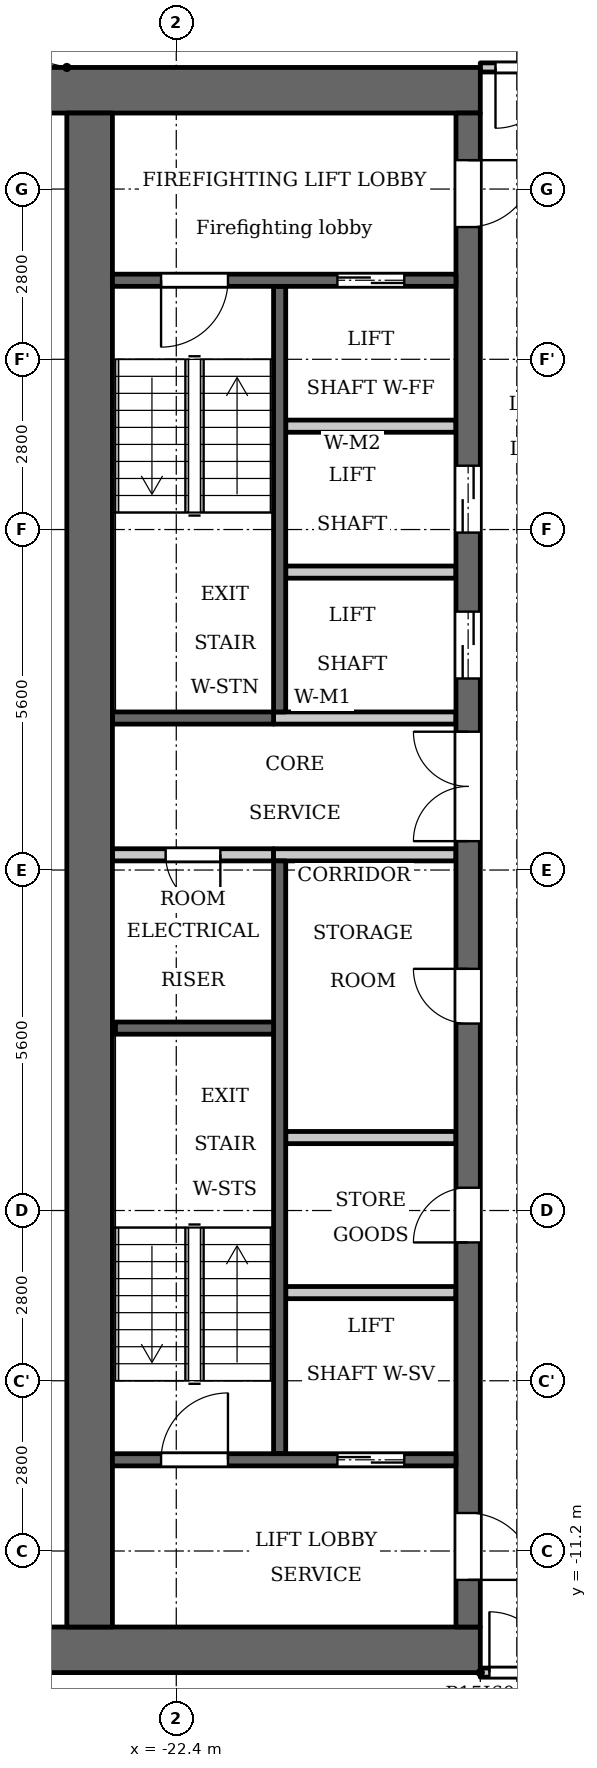
"""IFC4 building model, lengths in metres.
Left out: names, types, materials, properties, quantities, classifications, styles, units other than length and angle.
Written with IfcOpenShell. Run it as: python <this file> out.ifc"""

import sys

from ifc_helpers import new_model, si_unit, direction, frame, frame_2d, origin, place, context, subcontext, project, spatial, rectangle, extrude, element, fill, save


model = new_model("IFC4")
c1 = context("Model", 3, precision=1e-05, world=origin(), true_north=direction((0.0, 1.0)))
c2 = subcontext(c1, "Body", "Model", "MODEL_VIEW")
j1 = project(units=[si_unit("LENGTHUNIT", "METRE"), si_unit("PLANEANGLEUNIT", "RADIAN")], contexts=[c1])
p1 = place(None, origin())
s1 = spatial("IfcSite", under=j1, at=p1, CompositionType="ELEMENT")
p2 = place(p1, origin())
s2 = spatial("IfcBuilding", under=s1, at=p2, CompositionType="ELEMENT")
p3 = place(p2, frame((0.0, 0.0, 195.9)))
s3 = spatial("IfcBuildingStorey", under=s2, at=p3, CompositionType="ELEMENT", Elevation=195.9)
p4 = place(p3, frame((-20.7, 2.6, 0.0), z_axis=(0.0, 0.0, 1.0), x_axis=(0.0, 1.0, 0.0)))
e1 = element("IfcWall", 1, at=p4, inside=s3, PredefinedType="SHEAR", context=c2, shape_type="SweptSolid", body=[
    extrude(rectangle(XDim=7.0, YDim=0.2, at=frame_2d((3.5, 0.0))), origin(), (0.0, 0.0, 1.0), 3.2),
])
p5 = place(p3, frame((-20.7, -9.6, 0.0), z_axis=(0.0, 0.0, 1.0), x_axis=(0.0, 1.0, 0.0)))
e2 = element("IfcWall", 2, at=p5, inside=s3, PredefinedType="SHEAR", context=c2, shape_type="SweptSolid", body=[
    extrude(rectangle(XDim=9.75, YDim=0.2, at=frame_2d((4.875, 0.0))), origin(), (0.0, 0.0, 1.0), 3.2),
])
p6 = place(p3, frame((-20.8, 2.5, 0.0), z_axis=(0.0, 0.0, 1.0), x_axis=(-1.0, 0.0, 0.0)))
e3 = element("IfcWall", 3, at=p6, inside=s3, PredefinedType="SHEAR", context=c2, shape_type="SweptSolid", body=[
    extrude(rectangle(XDim=2.65, YDim=0.2, at=frame_2d((1.325, 0.0))), origin(), (0.0, 0.0, 1.0), 3.2),
])
p7 = place(p3, frame((-20.8, 0.25, 0.0), z_axis=(0.0, 0.0, 1.0), x_axis=(-1.0, 0.0, 0.0)))
e4 = element("IfcWall", 4, at=p7, inside=s3, PredefinedType="PARTITIONING", context=c2, shape_type="SweptSolid", body=[
    extrude(rectangle(XDim=2.65, YDim=0.2, at=frame_2d((1.325, 0.0))), origin(), (0.0, 0.0, 1.0), 3.2),
])
p8 = place(p7, frame((0.875, 0.0, 0.0)))
e5 = element("IfcOpeningElement", 5, at=p8, cuts=e4, PredefinedType="OPENING", context=c2, shape_type="SweptSolid", body=[
    extrude(rectangle(XDim=0.9, YDim=2.1, at=frame_2d((0.45, 1.05))), frame((0.0, 0.11, 0.0), z_axis=(0.0, -1.0, 0.0), x_axis=(1.0, 0.0, 0.0)), (0.0, 0.0, 1.0), 0.22),
])
for number, where, z_axis, x_axis in (
    (6, (-17.4, 12.825, 0.0), (0.0, 0.0, 1.0), (-1.0, 0.0, 0.0)),
    (7, (-17.4, -12.825, 0.0), (0.0, 0.0, 1.0), (-1.0, 0.0, 0.0)),
):
    element("IfcWall", number, at=place(p3, frame(where, z_axis=z_axis, x_axis=x_axis)), inside=s3, PredefinedType="SHEAR", context=c2, shape_type="SweptSolid", body=[
        extrude(rectangle(XDim=7.6, YDim=0.75, at=frame_2d((3.8, 0.0))), origin(), (0.0, 0.0, 1.0), 3.2),
    ])
p9 = place(p3, frame((-17.8, -4.4, 0.0), z_axis=(0.0, 0.0, 1.0), x_axis=(-1.0, 0.0, 0.0)))
e8 = element("IfcWall", 8, at=p9, inside=s3, PredefinedType="PARTITIONING", context=c2, shape_type="SweptSolid", body=[
    extrude(rectangle(XDim=2.8, YDim=0.2, at=frame_2d((1.4, 0.0))), origin(), (0.0, 0.0, 1.0), 3.2),
])
p10 = place(p3, frame((-17.6, -12.45, 0.0), z_axis=(0.0, 0.0, 1.0), x_axis=(0.0, 1.0, 0.0)))
e9 = element("IfcWall", 9, at=p10, inside=s3, PredefinedType="SHEAR", context=c2, shape_type="SweptSolid", body=[
    extrude(rectangle(XDim=24.9, YDim=0.4, at=frame_2d((12.45, 0.0))), origin(), (0.0, 0.0, 1.0), 3.2),
])
p11 = place(p10, frame((6.325, 0.0, 0.0)))
e10 = element("IfcOpeningElement", 10, at=p11, cuts=e9, PredefinedType="OPENING", context=c2, shape_type="SweptSolid", body=[
    extrude(rectangle(XDim=0.9, YDim=2.1, at=frame_2d((0.45, 1.05))), frame((0.0, 0.21, 0.0), z_axis=(0.0, -1.0, 0.0), x_axis=(1.0, 0.0, 0.0)), (0.0, 0.0, 1.0), 0.42),
])
p12 = place(p10, frame((9.925, 0.0, 0.0)))
e11 = element("IfcOpeningElement", 11, at=p12, cuts=e9, PredefinedType="OPENING", context=c2, shape_type="SweptSolid", body=[
    extrude(rectangle(XDim=0.9, YDim=2.1, at=frame_2d((0.45, 1.05))), frame((0.0, 0.21, 0.0), z_axis=(0.0, -1.0, 0.0), x_axis=(1.0, 0.0, 0.0)), (0.0, 0.0, 1.0), 0.42),
])
p13 = place(p10, frame((15.6, 0.0, 0.0)))
e12 = element("IfcOpeningElement", 12, at=p13, cuts=e9, PredefinedType="OPENING", context=c2, shape_type="SweptSolid", body=[
    extrude(rectangle(XDim=1.1, YDim=2.1, at=frame_2d((0.55, 1.05))), frame((0.0, 0.21, 0.0), z_axis=(0.0, -1.0, 0.0), x_axis=(1.0, 0.0, 0.0)), (0.0, 0.0, 1.0), 0.42),
])
p14 = place(p10, frame((18.0, 0.0, 0.0)))
e13 = element("IfcOpeningElement", 13, at=p14, cuts=e9, PredefinedType="OPENING", context=c2, shape_type="SweptSolid", body=[
    extrude(rectangle(XDim=1.1, YDim=2.1, at=frame_2d((0.55, 1.05))), frame((0.0, 0.21, 0.0), z_axis=(0.0, -1.0, 0.0), x_axis=(1.0, 0.0, 0.0)), (0.0, 0.0, 1.0), 0.42),
])
p15 = place(p10, frame((23.025, 0.0, 0.0)))
e14 = element("IfcOpeningElement", 14, at=p15, cuts=e9, PredefinedType="OPENING", context=c2, shape_type="SweptSolid", body=[
    extrude(rectangle(XDim=1.1, YDim=2.1, at=frame_2d((0.55, 1.05))), frame((0.0, 0.21, 0.0), z_axis=(0.0, -1.0, 0.0), x_axis=(1.0, 0.0, 0.0)), (0.0, 0.0, 1.0), 0.42),
])
p16 = place(p10, frame((0.775, 0.0, 0.0)))
e15 = element("IfcOpeningElement", 15, at=p16, cuts=e9, PredefinedType="OPENING", context=c2, shape_type="SweptSolid", body=[
    extrude(rectangle(XDim=1.1, YDim=2.1, at=frame_2d((0.55, 1.05))), frame((0.0, 0.21, 0.0), z_axis=(0.0, -1.0, 0.0), x_axis=(1.0, 0.0, 0.0)), (0.0, 0.0, 1.0), 0.42),
])
p17 = place(p10, frame((12.925, 0.0, 0.0)))
e16 = element("IfcOpeningElement", 16, at=p17, cuts=e9, PredefinedType="OPENING", context=c2, shape_type="SweptSolid", body=[
    extrude(rectangle(XDim=1.8, YDim=2.1, at=frame_2d((0.9, 1.05))), frame((0.0, 0.21, 0.0), z_axis=(0.0, -1.0, 0.0), x_axis=(1.0, 0.0, 0.0)), (0.0, 0.0, 1.0), 0.42),
])
p18 = place(p3, frame((-23.825, -12.45, 0.0), z_axis=(0.0, 0.0, 1.0), x_axis=(0.0, 1.0, 0.0)))
e17 = element("IfcWall", 17, at=p18, inside=s3, PredefinedType="SHEAR", context=c2, shape_type="SweptSolid", body=[
    extrude(rectangle(XDim=24.9, YDim=0.75, at=frame_2d((12.45, 0.0))), origin(), (0.0, 0.0, 1.0), 3.2),
])
p19 = place(p3, frame((-17.8, -9.7, 0.0), z_axis=(0.0, 0.0, 1.0), x_axis=(-1.0, 0.0, 0.0)))
e18 = element("IfcWall", 18, at=p19, inside=s3, PredefinedType="SHEAR", context=c2, shape_type="SweptSolid", body=[
    extrude(rectangle(XDim=5.65, YDim=0.2, at=frame_2d((2.825, 0.0))), origin(), (0.0, 0.0, 1.0), 3.2),
])
p20 = place(p19, frame((0.85, 0.0, 0.0)))
e19 = element("IfcOpeningElement", 19, at=p20, cuts=e18, PredefinedType="OPENING", context=c2, shape_type="SweptSolid", body=[
    extrude(rectangle(XDim=1.1, YDim=2.1, at=frame_2d((0.55, 1.05))), frame((0.0, 0.11, 0.0), z_axis=(0.0, -1.0, 0.0), x_axis=(1.0, 0.0, 0.0)), (0.0, 0.0, 1.0), 0.22),
])
p21 = place(p19, frame((3.75, 0.0, 0.0)))
e20 = element("IfcOpeningElement", 20, at=p21, cuts=e18, PredefinedType="OPENING", context=c2, shape_type="SweptSolid", body=[
    extrude(rectangle(XDim=1.1, YDim=2.1, at=frame_2d((0.55, 1.05))), frame((0.0, 0.11, 0.0), z_axis=(0.0, -1.0, 0.0), x_axis=(1.0, 0.0, 0.0)), (0.0, 0.0, 1.0), 0.22),
])
p22 = place(p3, frame((-17.8, -6.95, 0.0), z_axis=(0.0, 0.0, 1.0), x_axis=(-1.0, 0.0, 0.0)))
e21 = element("IfcWall", 21, at=p22, inside=s3, PredefinedType="PARTITIONING", context=c2, shape_type="SweptSolid", body=[
    extrude(rectangle(XDim=2.8, YDim=0.2, at=frame_2d((1.4, 0.0))), origin(), (0.0, 0.0, 1.0), 3.2),
])
for number, where, z_axis, x_axis in (
    (22, (-17.8, 0.25, 0.0), (0.0, 0.0, 1.0), (-1.0, 0.0, 0.0)),
    (23, (-17.8, 2.5, 0.0), (0.0, 0.0, 1.0), (-1.0, 0.0, 0.0)),
):
    element("IfcWall", number, at=place(p3, frame(where, z_axis=z_axis, x_axis=x_axis)), inside=s3, PredefinedType="PARTITIONING", context=c2, shape_type="SweptSolid", body=[
        extrude(rectangle(XDim=3.0, YDim=0.2, at=frame_2d((1.5, 0.0))), origin(), (0.0, 0.0, 1.0), 3.2),
    ])
for number, where, z_axis, x_axis in (
    (24, (-17.8, 4.9, 0.0), (0.0, 0.0, 1.0), (-1.0, 0.0, 0.0)),
    (25, (-17.8, 7.3, 0.0), (0.0, 0.0, 1.0), (-1.0, 0.0, 0.0)),
):
    element("IfcWall", number, at=place(p3, frame(where, z_axis=z_axis, x_axis=x_axis)), inside=s3, PredefinedType="PARTITIONING", context=c2, shape_type="SweptSolid", body=[
        extrude(rectangle(XDim=2.8, YDim=0.2, at=frame_2d((1.4, 0.0))), origin(), (0.0, 0.0, 1.0), 3.2),
    ])
p23 = place(p3, frame((-17.8, 9.7, 0.0), z_axis=(0.0, 0.0, 1.0), x_axis=(-1.0, 0.0, 0.0)))
e26 = element("IfcWall", 26, at=p23, inside=s3, PredefinedType="SHEAR", context=c2, shape_type="SweptSolid", body=[
    extrude(rectangle(XDim=5.65, YDim=0.2, at=frame_2d((2.825, 0.0))), origin(), (0.0, 0.0, 1.0), 3.2),
])
p24 = place(p23, frame((0.85, 0.0, 0.0)))
e27 = element("IfcOpeningElement", 27, at=p24, cuts=e26, PredefinedType="OPENING", context=c2, shape_type="SweptSolid", body=[
    extrude(rectangle(XDim=1.1, YDim=2.1, at=frame_2d((0.55, 1.05))), frame((0.0, 0.11, 0.0), z_axis=(0.0, -1.0, 0.0), x_axis=(1.0, 0.0, 0.0)), (0.0, 0.0, 1.0), 0.22),
])
p25 = place(p23, frame((3.75, 0.0, 0.0)))
e28 = element("IfcOpeningElement", 28, at=p25, cuts=e26, PredefinedType="OPENING", context=c2, shape_type="SweptSolid", body=[
    extrude(rectangle(XDim=1.1, YDim=2.1, at=frame_2d((0.55, 1.05))), frame((0.0, 0.11, 0.0), z_axis=(0.0, -1.0, 0.0), x_axis=(1.0, 0.0, 0.0)), (0.0, 0.0, 1.0), 0.22),
])
p26 = place(p3, frame((-20.8, -2.6, 0.0), z_axis=(0.0, 0.0, 1.0), x_axis=(-1.0, 0.0, 0.0)))
e29 = element("IfcWall", 29, at=p26, inside=s3, PredefinedType="SHEAR", context=c2, shape_type="SweptSolid", body=[
    extrude(rectangle(XDim=2.6, YDim=0.2, at=frame_2d((1.3, 0.0))), origin(), (0.0, 0.0, 1.0), 3.2),
])
p27 = place(p3, frame((-17.4, -13.2, 0.0), z_axis=(0.0, 0.0, 1.0), x_axis=(1.0, 0.0, 0.0)))
e30 = element("IfcWall", 30, at=p27, inside=s3, PredefinedType="PARTITIONING", context=c2, shape_type="SweptSolid", body=[
    extrude(rectangle(XDim=34.8, YDim=0.15, at=frame_2d((17.4, 0.0))), origin(), (0.0, 0.0, 1.0), 3.2),
])
p28 = place(p27, frame((0.15, 0.0, 0.0)))
e31 = element("IfcOpeningElement", 31, at=p28, cuts=e30, PredefinedType="OPENING", context=c2, shape_type="SweptSolid", body=[
    extrude(rectangle(XDim=1.0, YDim=2.1, at=frame_2d((0.5, 1.05))), frame((0.0, 0.085, 0.0), z_axis=(0.0, -1.0, 0.0), x_axis=(1.0, 0.0, 0.0)), (0.0, 0.0, 1.0), 0.17),
])
p29 = place(p27, frame((33.55, 0.0, 0.0)))
e32 = element("IfcOpeningElement", 32, at=p29, cuts=e30, PredefinedType="OPENING", context=c2, shape_type="SweptSolid", body=[
    extrude(rectangle(XDim=1.0, YDim=2.1, at=frame_2d((0.5, 1.05))), frame((0.0, 0.085, 0.0), z_axis=(0.0, -1.0, 0.0), x_axis=(1.0, 0.0, 0.0)), (0.0, 0.0, 1.0), 0.17),
])
p30 = place(p27, frame((15.7, 0.0, 0.0)))
e33 = element("IfcOpeningElement", 33, at=p30, cuts=e30, PredefinedType="OPENING", context=c2, shape_type="SweptSolid", body=[
    extrude(rectangle(XDim=1.0, YDim=2.1, at=frame_2d((0.5, 1.05))), frame((0.0, 0.085, 0.0), z_axis=(0.0, -1.0, 0.0), x_axis=(1.0, 0.0, 0.0)), (0.0, 0.0, 1.0), 0.17),
])
p31 = place(p27, frame((26.9, 0.0, 0.0)))
e34 = element("IfcOpeningElement", 34, at=p31, cuts=e30, PredefinedType="OPENING", context=c2, shape_type="SweptSolid", body=[
    extrude(rectangle(XDim=1.0, YDim=2.1, at=frame_2d((0.5, 1.05))), frame((0.0, 0.085, 0.0), z_axis=(0.0, -1.0, 0.0), x_axis=(1.0, 0.0, 0.0)), (0.0, 0.0, 1.0), 0.17),
])
p32 = place(p3, frame((-17.4, 13.2, 0.0), z_axis=(0.0, 0.0, 1.0), x_axis=(1.0, 0.0, 0.0)))
e35 = element("IfcWall", 35, at=p32, inside=s3, PredefinedType="PARTITIONING", context=c2, shape_type="SweptSolid", body=[
    extrude(rectangle(XDim=34.8, YDim=0.15, at=frame_2d((17.4, 0.0))), origin(), (0.0, 0.0, 1.0), 3.2),
])
p33 = place(p32, frame((0.25, 0.0, 0.0)))
e36 = element("IfcOpeningElement", 36, at=p33, cuts=e35, PredefinedType="OPENING", context=c2, shape_type="SweptSolid", body=[
    extrude(rectangle(XDim=1.0, YDim=2.1, at=frame_2d((0.5, 1.05))), frame((0.0, 0.085, 0.0), z_axis=(0.0, -1.0, 0.0), x_axis=(1.0, 0.0, 0.0)), (0.0, 0.0, 1.0), 0.17),
])
p34 = place(p32, frame((33.65, 0.0, 0.0)))
e37 = element("IfcOpeningElement", 37, at=p34, cuts=e35, PredefinedType="OPENING", context=c2, shape_type="SweptSolid", body=[
    extrude(rectangle(XDim=1.0, YDim=2.1, at=frame_2d((0.5, 1.05))), frame((0.0, 0.085, 0.0), z_axis=(0.0, -1.0, 0.0), x_axis=(1.0, 0.0, 0.0)), (0.0, 0.0, 1.0), 0.17),
])
p35 = place(p32, frame((10.15, 0.0, 0.0)))
e38 = element("IfcOpeningElement", 38, at=p35, cuts=e35, PredefinedType="OPENING", context=c2, shape_type="SweptSolid", body=[
    extrude(rectangle(XDim=1.0, YDim=2.1, at=frame_2d((0.5, 1.05))), frame((0.0, 0.085, 0.0), z_axis=(0.0, -1.0, 0.0), x_axis=(1.0, 0.0, 0.0)), (0.0, 0.0, 1.0), 0.17),
])
p36 = place(p32, frame((13.55, 0.0, 0.0)))
e39 = element("IfcOpeningElement", 39, at=p36, cuts=e35, PredefinedType="OPENING", context=c2, shape_type="SweptSolid", body=[
    extrude(rectangle(XDim=1.0, YDim=2.1, at=frame_2d((0.5, 1.05))), frame((0.0, 0.085, 0.0), z_axis=(0.0, -1.0, 0.0), x_axis=(1.0, 0.0, 0.0)), (0.0, 0.0, 1.0), 0.17),
])
p37 = place(p32, frame((20.85, 0.0, 0.0)))
e40 = element("IfcOpeningElement", 40, at=p37, cuts=e35, PredefinedType="OPENING", context=c2, shape_type="SweptSolid", body=[
    extrude(rectangle(XDim=1.0, YDim=2.1, at=frame_2d((0.5, 1.05))), frame((0.0, 0.085, 0.0), z_axis=(0.0, -1.0, 0.0), x_axis=(1.0, 0.0, 0.0)), (0.0, 0.0, 1.0), 0.17),
])
p38 = place(p32, frame((23.7, 0.0, 0.0)))
e41 = element("IfcOpeningElement", 41, at=p38, cuts=e35, PredefinedType="OPENING", context=c2, shape_type="SweptSolid", body=[
    extrude(rectangle(XDim=1.0, YDim=2.1, at=frame_2d((0.5, 1.05))), frame((0.0, 0.085, 0.0), z_axis=(0.0, -1.0, 0.0), x_axis=(1.0, 0.0, 0.0)), (0.0, 0.0, 1.0), 0.17),
])
p39 = place(p20, origin())
e42 = element("IfcDoor", 42, at=p39, inside=s3, OperationType="DOUBLE_DOOR_SLIDING", PredefinedType="DOOR", context=c2, shape_type="SweptSolid", body=[
    extrude(rectangle(XDim=1.1, YDim=2.1, at=frame_2d((0.55, 1.05))), frame((0.0, 0.025, 0.0), z_axis=(0.0, -1.0, 0.0), x_axis=(1.0, 0.0, 0.0)), (0.0, 0.0, 1.0), 0.05),
])
fill(e19, e42)
p40 = place(p11, origin())
e43 = element("IfcDoor", 43, at=p40, inside=s3, OperationType="SINGLE_SWING_RIGHT", PredefinedType="DOOR", context=c2, shape_type="SweptSolid", body=[
    extrude(rectangle(XDim=0.9, YDim=2.1, at=frame_2d((0.45, 1.05))), frame((0.0, 0.025, 0.0), z_axis=(0.0, -1.0, 0.0), x_axis=(1.0, 0.0, 0.0)), (0.0, 0.0, 1.0), 0.05),
])
fill(e10, e43)
p41 = place(p12, origin())
e44 = element("IfcDoor", 44, at=p41, inside=s3, OperationType="SINGLE_SWING_LEFT", PredefinedType="DOOR", context=c2, shape_type="SweptSolid", body=[
    extrude(rectangle(XDim=0.9, YDim=2.1, at=frame_2d((0.45, 1.05))), frame((0.0, 0.025, 0.0), z_axis=(0.0, -1.0, 0.0), x_axis=(1.0, 0.0, 0.0)), (0.0, 0.0, 1.0), 0.05),
])
fill(e11, e44)
p42 = place(p13, origin())
e45 = element("IfcDoor", 45, at=p42, inside=s3, OperationType="DOUBLE_DOOR_SLIDING", PredefinedType="DOOR", context=c2, shape_type="SweptSolid", body=[
    extrude(rectangle(XDim=1.1, YDim=2.1, at=frame_2d((0.55, 1.05))), frame((0.0, 0.025, 0.0), z_axis=(0.0, -1.0, 0.0), x_axis=(1.0, 0.0, 0.0)), (0.0, 0.0, 1.0), 0.05),
])
fill(e12, e45)
p43 = place(p14, origin())
e46 = element("IfcDoor", 46, at=p43, inside=s3, OperationType="DOUBLE_DOOR_SLIDING", PredefinedType="DOOR", context=c2, shape_type="SweptSolid", body=[
    extrude(rectangle(XDim=1.1, YDim=2.1, at=frame_2d((0.55, 1.05))), frame((0.0, 0.025, 0.0), z_axis=(0.0, -1.0, 0.0), x_axis=(1.0, 0.0, 0.0)), (0.0, 0.0, 1.0), 0.05),
])
fill(e13, e46)
p44 = place(p24, origin())
e47 = element("IfcDoor", 47, at=p44, inside=s3, OperationType="DOUBLE_DOOR_SLIDING", PredefinedType="DOOR", context=c2, shape_type="SweptSolid", body=[
    extrude(rectangle(XDim=1.1, YDim=2.1, at=frame_2d((0.55, 1.05))), frame((0.0, 0.025, 0.0), z_axis=(0.0, -1.0, 0.0), x_axis=(1.0, 0.0, 0.0)), (0.0, 0.0, 1.0), 0.05),
])
fill(e27, e47)
p45 = place(p15, origin())
e48 = element("IfcDoor", 48, at=p45, inside=s3, OperationType="SINGLE_SWING_RIGHT", PredefinedType="DOOR", context=c2, shape_type="SweptSolid", body=[
    extrude(rectangle(XDim=1.1, YDim=2.1, at=frame_2d((0.55, 1.05))), frame((0.0, 0.025, 0.0), z_axis=(0.0, -1.0, 0.0), x_axis=(1.0, 0.0, 0.0)), (0.0, 0.0, 1.0), 0.05),
])
fill(e14, e48)
p46 = place(p16, origin())
e49 = element("IfcDoor", 49, at=p46, inside=s3, OperationType="SINGLE_SWING_LEFT", PredefinedType="DOOR", context=c2, shape_type="SweptSolid", body=[
    extrude(rectangle(XDim=1.1, YDim=2.1, at=frame_2d((0.55, 1.05))), frame((0.0, 0.025, 0.0), z_axis=(0.0, -1.0, 0.0), x_axis=(1.0, 0.0, 0.0)), (0.0, 0.0, 1.0), 0.05),
])
fill(e15, e49)
p47 = place(p25, origin())
e50 = element("IfcDoor", 50, at=p47, inside=s3, OperationType="SINGLE_SWING_LEFT", PredefinedType="DOOR", context=c2, shape_type="SweptSolid", body=[
    extrude(rectangle(XDim=1.1, YDim=2.1, at=frame_2d((0.55, 1.05))), frame((0.0, 0.025, 0.0), z_axis=(0.0, -1.0, 0.0), x_axis=(1.0, 0.0, 0.0)), (0.0, 0.0, 1.0), 0.05),
])
fill(e28, e50)
p48 = place(p21, origin())
e51 = element("IfcDoor", 51, at=p48, inside=s3, OperationType="SINGLE_SWING_LEFT", PredefinedType="DOOR", context=c2, shape_type="SweptSolid", body=[
    extrude(rectangle(XDim=1.1, YDim=2.1, at=frame_2d((0.55, 1.05))), frame((0.0, 0.025, 0.0), z_axis=(0.0, -1.0, 0.0), x_axis=(1.0, 0.0, 0.0)), (0.0, 0.0, 1.0), 0.05),
])
fill(e20, e51)
p49 = place(p17, origin())
e52 = element("IfcDoor", 52, at=p49, inside=s3, OperationType="DOUBLE_DOOR_SINGLE_SWING", PredefinedType="DOOR", context=c2, shape_type="SweptSolid", body=[
    extrude(rectangle(XDim=1.8, YDim=2.1, at=frame_2d((0.9, 1.05))), frame((0.0, 0.025, 0.0), z_axis=(0.0, -1.0, 0.0), x_axis=(1.0, 0.0, 0.0)), (0.0, 0.0, 1.0), 0.05),
])
fill(e16, e52)
p50 = place(p8, origin())
e53 = element("IfcDoor", 53, at=p50, inside=s3, OperationType="SINGLE_SWING_RIGHT", PredefinedType="DOOR", context=c2, shape_type="SweptSolid", body=[
    extrude(rectangle(XDim=0.9, YDim=2.1, at=frame_2d((0.45, 1.05))), frame((0.0, 0.025, 0.0), z_axis=(0.0, -1.0, 0.0), x_axis=(1.0, 0.0, 0.0)), (0.0, 0.0, 1.0), 0.05),
])
fill(e5, e53)
p51 = place(p33, origin())
e54 = element("IfcDoor", 54, at=p51, inside=s3, OperationType="SINGLE_SWING_LEFT", PredefinedType="DOOR", context=c2, shape_type="SweptSolid", body=[
    extrude(rectangle(XDim=1.0, YDim=2.1, at=frame_2d((0.5, 1.05))), frame((0.0, 0.025, 0.0), z_axis=(0.0, -1.0, 0.0), x_axis=(1.0, 0.0, 0.0)), (0.0, 0.0, 1.0), 0.05),
])
fill(e36, e54)
p52 = place(p28, origin())
e55 = element("IfcDoor", 55, at=p52, inside=s3, OperationType="SINGLE_SWING_RIGHT", PredefinedType="DOOR", context=c2, shape_type="SweptSolid", body=[
    extrude(rectangle(XDim=1.0, YDim=2.1, at=frame_2d((0.5, 1.05))), frame((0.0, 0.025, 0.0), z_axis=(0.0, -1.0, 0.0), x_axis=(1.0, 0.0, 0.0)), (0.0, 0.0, 1.0), 0.05),
])
fill(e31, e55)
save(model, sys.argv[1])
